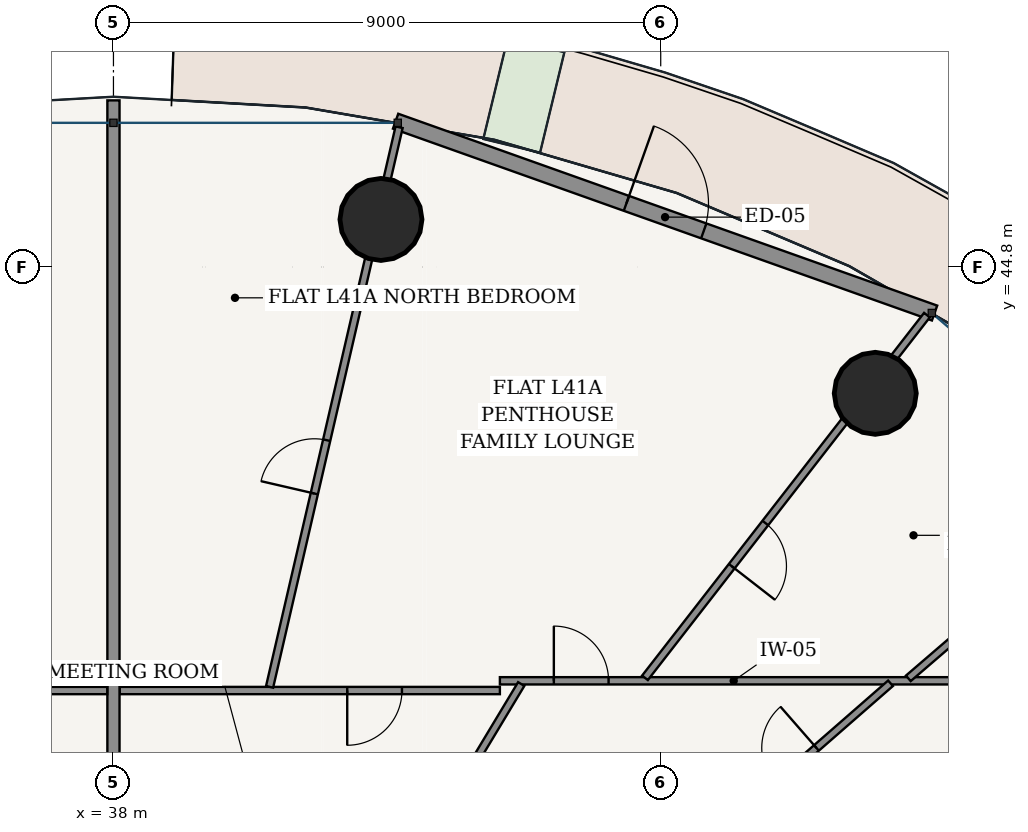
"""IFC4 building model, lengths in metres.
Left out: names, types, materials, properties, quantities, classifications, styles, units other than length and angle.
Written with IfcOpenShell. Run it as: python <this file> out.ifc"""

import sys

from ifc_helpers import new_model, si_unit, direction, frame, frame_2d, origin, origin_2d, place, context, subcontext, project, spatial, rectangle, hollow_circle, extrude, source, transform, mapped, element, fill, save


model = new_model("IFC4")
c1 = context("Model", 3, precision=1e-05, world=origin(), true_north=direction((-0.2419218956, 0.970295726276)))
c2 = subcontext(c1, "Body", "Model", "MODEL_VIEW")
j1 = project(units=[si_unit("LENGTHUNIT", "METRE"), si_unit("PLANEANGLEUNIT", "RADIAN")], contexts=[c1])
p1 = place(None, origin())
s1 = spatial("IfcSite", under=j1, at=p1, CompositionType="ELEMENT")
p2 = place(p1, origin())
s2 = spatial("IfcBuilding", under=s1, at=p2, CompositionType="ELEMENT")
p3 = place(p2, frame((0.0, 0.0, 157.0)))
s3 = spatial("IfcBuildingStorey", under=s2, at=p3, CompositionType="ELEMENT", Elevation=157.0)
for number, where, z_axis, x_axis in (
    (1, (50.528, 42.723, 0.0), (0.0, 0.0, 1.0), (1.0, 0.0, 0.0)),
    (2, (42.399, 45.582, 0.0), (0.0, 0.0, 1.0), (1.0, 0.0, 0.0)),
):
    element("IfcColumn", number, at=place(p3, frame(where, z_axis=z_axis, x_axis=x_axis)), inside=s3, PredefinedType="COLUMN", context=c2, shape_type="SweptSolid", body=[
        extrude(hollow_circle(Radius=0.675, WallThickness=0.042, at=origin_2d()), origin(), (0.0, 0.0, 1.0), 3.6),
    ])
p4 = place(p3, frame((51.503, 44.043, 0.0), z_axis=(0.0, 0.0, 1.0), x_axis=(-0.942095406405, 0.335344964522, 0.0)))
e3 = element("IfcWall", 3, at=p4, inside=s3, PredefinedType="SOLIDWALL", context=c2, shape_type="SweptSolid", body=[
    extrude(rectangle(XDim=9.408, YDim=0.26, at=frame_2d((4.704, 0.0))), origin(), (0.0, 0.0, 1.0), 3.33),
])
p5 = place(p4, frame((4.029, 0.0, 0.0)))
e4 = element("IfcOpeningElement", 4, at=p5, cuts=e3, PredefinedType="OPENING", context=c2, shape_type="SweptSolid", body=[
    extrude(rectangle(XDim=1.35, YDim=2.2, at=frame_2d((0.675, 1.1))), frame((0.0, 0.14, 0.0), z_axis=(0.0, -1.0, 0.0), x_axis=(1.0, 0.0, 0.0)), (0.0, 0.0, 1.0), 0.28),
])
p6 = place(p3, frame((38.102, 37.835, 0.0), z_axis=(0.0, 0.0, 1.0), x_axis=(1.0, 0.0, 0.0)))
e5 = element("IfcWall", 5, at=p6, inside=s3, PredefinedType="PARTITIONING", context=c2, shape_type="SweptSolid", body=[
    extrude(rectangle(XDim=6.253, YDim=0.12, at=frame_2d((3.126, 0.0))), origin(), (0.0, 0.0, 1.0), 2.776),
])
p7 = place(p6, frame((3.742, 0.0, 0.0)))
e6 = element("IfcOpeningElement", 6, at=p7, cuts=e5, PredefinedType="OPENING", context=c2, shape_type="SweptSolid", body=[
    extrude(rectangle(XDim=0.9, YDim=2.15, at=frame_2d((0.45, 1.075))), frame((0.0, 0.07, 0.0), z_axis=(0.0, -1.0, 0.0), x_axis=(1.0, 0.0, 0.0)), (0.0, 0.0, 1.0), 0.14),
])
p8 = place(p3, frame((44.355, 37.995, 0.0), z_axis=(0.0, 0.0, 1.0), x_axis=(1.0, 0.0, 0.0)))
e7 = element("IfcWall", 7, at=p8, inside=s3, PredefinedType="PARTITIONING", context=c2, shape_type="SweptSolid", body=[
    extrude(rectangle(XDim=7.69, YDim=0.12, at=frame_2d((3.845, 0.0))), origin(), (0.0, 0.0, 1.0), 2.776),
])
p9 = place(p8, frame((0.887, 0.0, 0.0)))
e8 = element("IfcOpeningElement", 8, at=p9, cuts=e7, PredefinedType="OPENING", context=c2, shape_type="SweptSolid", body=[
    extrude(rectangle(XDim=0.9, YDim=2.15, at=frame_2d((0.45, 1.075))), frame((0.0, 0.07, 0.0), z_axis=(0.0, -1.0, 0.0), x_axis=(1.0, 0.0, 0.0)), (0.0, 0.0, 1.0), 0.14),
])
p10 = place(p3, frame((51.072, 38.035, 0.0), z_axis=(0.0, 0.0, 1.0), x_axis=(0.758368609512, 0.65182593697, 0.0)))
e9 = element("IfcWall", 9, at=p10, inside=s3, PredefinedType="PARTITIONING", context=c2, shape_type="SweptSolid", body=[
    extrude(rectangle(XDim=5.263, YDim=0.12, at=frame_2d((2.632, 0.0))), origin(), (0.0, 0.0, 1.0), 2.846),
])
p11 = place(p3, frame((46.741, 38.044, 0.0), z_axis=(0.0, 0.0, 1.0), x_axis=(0.613770587295, 0.789484430607, 0.0)))
e10 = element("IfcWall", 10, at=p11, inside=s3, PredefinedType="PARTITIONING", context=c2, shape_type="SweptSolid", body=[
    extrude(rectangle(XDim=7.556, YDim=0.12, at=frame_2d((3.778, 0.0))), origin(), (0.0, 0.0, 1.0), 2.776),
])
p12 = place(p11, frame((2.325, 0.0, 0.0)))
e11 = element("IfcOpeningElement", 11, at=p12, cuts=e10, PredefinedType="OPENING", context=c2, shape_type="SweptSolid", body=[
    extrude(rectangle(XDim=0.9, YDim=2.15, at=frame_2d((0.45, 1.075))), frame((0.0, 0.07, 0.0), z_axis=(0.0, -1.0, 0.0), x_axis=(1.0, 0.0, 0.0)), (0.0, 0.0, 1.0), 0.14),
])
p13 = place(p3, frame((40.568, 37.896, 0.0), z_axis=(0.0, 0.0, 1.0), x_axis=(0.225452174141, 0.974254236416, 0.0)))
e12 = element("IfcWall", 12, at=p13, inside=s3, PredefinedType="PARTITIONING", context=c2, shape_type="SweptSolid", body=[
    extrude(rectangle(XDim=9.446, YDim=0.12, at=frame_2d((4.723, 0.0))), origin(), (0.0, 0.0, 1.0), 2.776),
])
p14 = place(p13, frame((3.264, 0.0, 0.0)))
e13 = element("IfcOpeningElement", 13, at=p14, cuts=e12, PredefinedType="OPENING", context=c2, shape_type="SweptSolid", body=[
    extrude(rectangle(XDim=0.9, YDim=2.15, at=frame_2d((0.45, 1.075))), frame((0.0, 0.07, 0.0), z_axis=(0.0, -1.0, 0.0), x_axis=(1.0, 0.0, 0.0)), (0.0, 0.0, 1.0), 0.14),
])
p15 = place(p3, frame((47.665, 35.236, 0.0), z_axis=(0.0, 0.0, 1.0), x_axis=(0.753384754287, 0.657579966246, 0.0)))
e14 = element("IfcWall", 14, at=p15, inside=s3, PredefinedType="PARTITIONING", context=c2, shape_type="SweptSolid", body=[
    extrude(rectangle(XDim=4.133, YDim=0.12, at=frame_2d((2.067, 0.0))), origin(), (0.0, 0.0, 1.0), 3.005),
])
p16 = place(p15, frame((1.617, 0.0, 0.0)))
e15 = element("IfcOpeningElement", 15, at=p16, cuts=e14, PredefinedType="OPENING", context=c2, shape_type="SweptSolid", body=[
    extrude(rectangle(XDim=0.9, YDim=2.15, at=frame_2d((0.45, 1.075))), frame((0.0, 0.07, 0.0), z_axis=(0.0, -1.0, 0.0), x_axis=(1.0, 0.0, 0.0)), (0.0, 0.0, 1.0), 0.14),
])
p17 = place(p3, frame((42.98, 35.075, 0.0), z_axis=(0.0, 0.0, 1.0), x_axis=(0.515686235332, 0.856777512946, 0.0)))
e16 = element("IfcWall", 16, at=p17, inside=s3, PredefinedType="PARTITIONING", context=c2, shape_type="SweptSolid", body=[
    extrude(rectangle(XDim=3.346, YDim=0.12, at=frame_2d((1.673, 0.0))), origin(), (0.0, 0.0, 1.0), 3.33),
])
p18 = place(p3, frame((38.0, 35.075, 0.0), z_axis=(0.0, 0.0, 1.0), x_axis=(0.0, 1.0, 0.0)))
e17 = element("IfcWall", 17, at=p18, inside=s3, PredefinedType="PARTITIONING", context=c2, shape_type="SweptSolid", body=[
    extrude(rectangle(XDim=12.465, YDim=0.2, at=frame_2d((6.232, 0.0))), origin(), (0.0, 0.0, 1.0), 2.415),
])
p19 = place(p3, frame((31.645, 37.835, 0.0), z_axis=(0.0, 0.0, 1.0), x_axis=(1.0, 0.0, 0.0)))
e18 = element("IfcWall", 18, at=p19, inside=s3, PredefinedType="PARTITIONING", context=c2, shape_type="SweptSolid", body=[
    extrude(rectangle(XDim=6.253, YDim=0.12, at=frame_2d((3.126, 0.0))), origin(), (0.0, 0.0, 1.0), 2.776),
])
m1 = source(origin(), c2, "Body", "SweptSolid", [
    extrude(rectangle(XDim=1.35, YDim=2.2, at=frame_2d((0.675, 1.1))), frame((0.0, 0.025, 0.0), z_axis=(0.0, -1.0, 0.0), x_axis=(1.0, 0.0, 0.0)), (0.0, 0.0, 1.0), 0.05),
])
p20 = place(p5, frame((1.35, 0.0, 0.0), z_axis=(0.0, 0.0, 1.0), x_axis=(-1.0, 0.0, 0.0)))
e19 = element("IfcDoor", 19, at=p20, inside=s3, OperationType="SINGLE_SWING_LEFT", PredefinedType="DOOR", context=c2, shape_type="MappedRepresentation", body=[
    mapped(m1, transform((0.0, 0.0, 0.0), scale=1.0)),
])
fill(e4, e19)
m2 = source(origin(), c2, "Body", "SweptSolid", [
    extrude(rectangle(XDim=0.9, YDim=2.15, at=frame_2d((0.45, 1.075))), frame((0.0, 0.025, 0.0), z_axis=(0.0, -1.0, 0.0), x_axis=(1.0, 0.0, 0.0)), (0.0, 0.0, 1.0), 0.05),
])
p21 = place(p16, origin())
e20 = element("IfcDoor", 20, at=p21, inside=s3, OperationType="SINGLE_SWING_RIGHT", PredefinedType="DOOR", context=c2, shape_type="MappedRepresentation", body=[
    mapped(m2, transform((0.0, 0.0, 0.0), scale=1.0)),
])
fill(e15, e20)
p22 = place(p9, origin())
e21 = element("IfcDoor", 21, at=p22, inside=s3, OperationType="SINGLE_SWING_LEFT", PredefinedType="DOOR", context=c2, shape_type="MappedRepresentation", body=[
    mapped(m2, transform((0.0, 0.0, 0.0), scale=1.0)),
])
fill(e8, e21)
p23 = place(p7, frame((0.9, 0.0, 0.0), z_axis=(0.0, 0.0, 1.0), x_axis=(-1.0, 0.0, 0.0)))
e22 = element("IfcDoor", 22, at=p23, inside=s3, OperationType="SINGLE_SWING_RIGHT", PredefinedType="DOOR", context=c2, shape_type="MappedRepresentation", body=[
    mapped(m2, transform((0.0, 0.0, 0.0), scale=1.0)),
])
fill(e6, e22)
p24 = place(p12, frame((0.9, 0.0, 0.0), z_axis=(0.0, 0.0, 1.0), x_axis=(-1.0, 0.0, 0.0)))
e23 = element("IfcDoor", 23, at=p24, inside=s3, OperationType="SINGLE_SWING_RIGHT", PredefinedType="DOOR", context=c2, shape_type="MappedRepresentation", body=[
    mapped(m2, transform((0.0, 0.0, 0.0), scale=1.0)),
])
fill(e11, e23)
p25 = place(p14, origin())
e24 = element("IfcDoor", 24, at=p25, inside=s3, OperationType="SINGLE_SWING_LEFT", PredefinedType="DOOR", context=c2, shape_type="MappedRepresentation", body=[
    mapped(m2, transform((0.0, 0.0, 0.0), scale=1.0)),
])
fill(e13, e24)
save(model, sys.argv[1])
